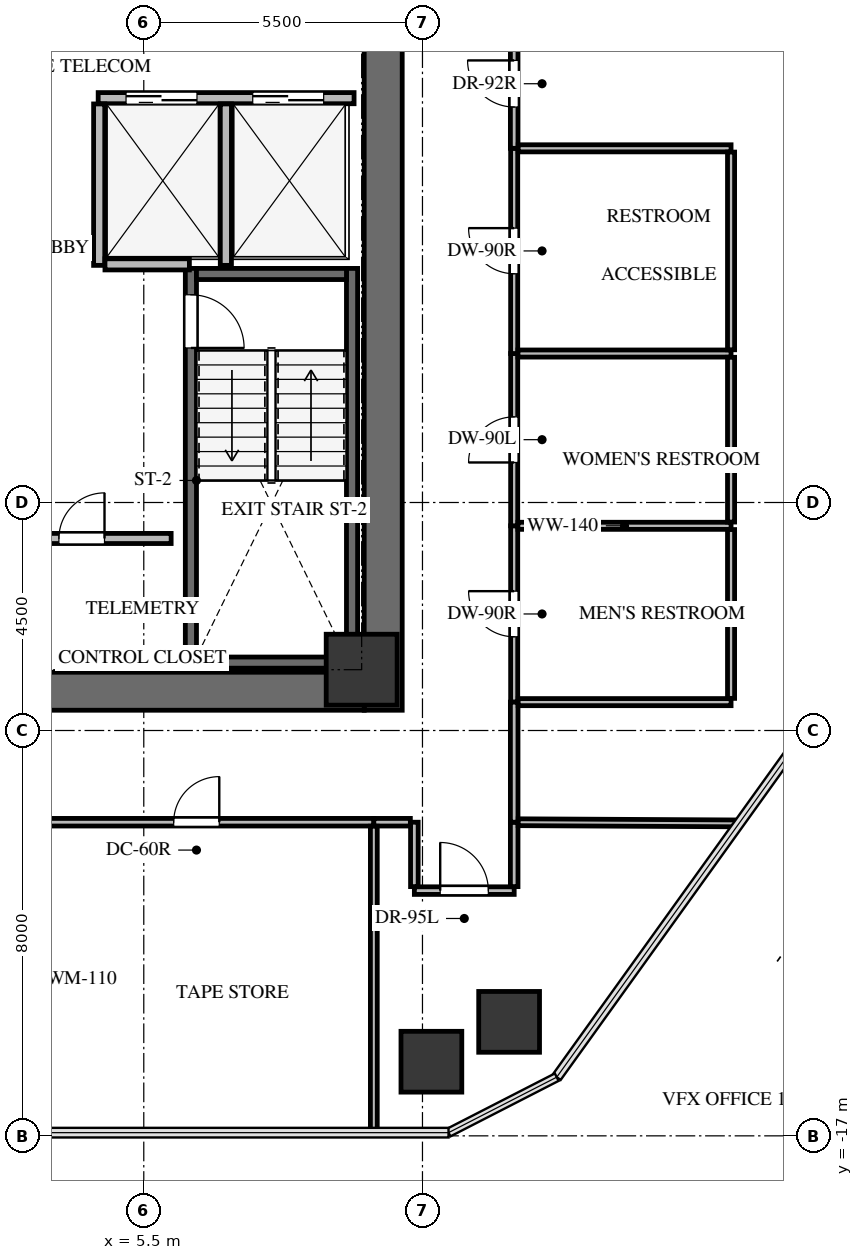
"""IFC4 building model, lengths in metres.
Left out: names, types, materials, properties, quantities, classifications, styles, units other than length and angle.
Written with IfcOpenShell. Run it as: python <this file> out.ifc"""

import sys

from ifc_helpers import new_model, si_unit, direction, frame, frame_2d, origin, origin_2d, place, context, subcontext, project, spatial, rectangle, extrude, source, transform, mapped, element, fill, save


model = new_model("IFC4")
c1 = context("Model", 3, precision=1e-05, world=origin(), true_north=direction((0.0, 1.0)))
c2 = subcontext(c1, "Body", "Model", "MODEL_VIEW")
j1 = project(units=[si_unit("LENGTHUNIT", "METRE"), si_unit("PLANEANGLEUNIT", "RADIAN")], contexts=[c1])
p1 = place(None, origin())
s1 = spatial("IfcSite", under=j1, at=p1, CompositionType="ELEMENT")
p2 = place(p1, origin())
s2 = spatial("IfcBuilding", under=s1, at=p2, CompositionType="ELEMENT")
p3 = place(p2, frame((0.0, 0.0, 107.4)))
s3 = spatial("IfcBuildingStorey", under=s2, at=p3, CompositionType="ELEMENT", Elevation=107.4)
p4 = place(p3, frame((10.225, -8.6, 0.0), z_axis=(0.0, 0.0, 1.0), x_axis=(0.0, 1.0, 0.0)))
e1 = element("IfcWall", 1, at=p4, inside=s3, PredefinedType="SHEAR", context=c2, shape_type="SweptSolid", body=[
    extrude(rectangle(XDim=17.2, YDim=0.75, at=frame_2d((8.6, 0.0))), origin(), (0.0, 0.0, 1.0), 3.3),
])
p5 = place(p3, frame((2.1, -8.225, 0.0), z_axis=(0.0, 0.0, 1.0), x_axis=(1.0, 0.0, 0.0)))
e2 = element("IfcWall", 2, at=p5, inside=s3, PredefinedType="SHEAR", context=c2, shape_type="SweptSolid", body=[
    extrude(rectangle(XDim=7.75, YDim=0.75, at=frame_2d((3.875, 0.0))), origin(), (0.0, 0.0, 1.0), 3.3),
])
p6 = place(p3, frame((9.61, -7.77, -0.24), z_axis=(0.0, 0.0, 1.0), x_axis=(0.0, 1.0, 0.0)))
e3 = element("IfcWall", 3, at=p6, inside=s3, PredefinedType="SHEAR", context=c2, shape_type="SweptSolid", body=[
    extrude(rectangle(XDim=7.89, YDim=0.22, at=frame_2d((3.945, 0.0))), origin(), (0.0, 0.0, 1.0), 3.3),
])
p7 = place(p3, frame((6.43, 0.12, -0.24), z_axis=(0.0, 0.0, 1.0), x_axis=(0.0, -1.0, 0.0)))
e4 = element("IfcWall", 4, at=p7, inside=s3, PredefinedType="SHEAR", context=c2, shape_type="SweptSolid", body=[
    extrude(rectangle(XDim=7.89, YDim=0.22, at=frame_2d((3.945, 0.0))), origin(), (0.0, 0.0, 1.0), 3.3),
])
p8 = place(p7, frame((0.52, 0.0, 0.0)))
e5 = element("IfcOpeningElement", 5, at=p8, cuts=e4, PredefinedType="OPENING", context=c2, shape_type="SweptSolid", body=[
    extrude(rectangle(XDim=1.05, YDim=2.15, at=frame_2d((0.525, 1.075))), frame((0.0, 0.12, 0.0), z_axis=(0.0, -1.0, 0.0), x_axis=(1.0, 0.0, 0.0)), (0.0, 0.0, 1.0), 0.24),
])
for number, where, z_axis, x_axis in (
    (6, (6.54, -7.66, -0.24), (0.0, 0.0, 1.0), (1.0, 0.0, 0.0)),
    (7, (9.5, 0.01, -0.24), (0.0, 0.0, 1.0), (-1.0, 0.0, 0.0)),
):
    element("IfcWall", number, at=place(p3, frame(where, z_axis=z_axis, x_axis=x_axis)), inside=s3, PredefinedType="SHEAR", context=c2, shape_type="SweptSolid", body=[
        extrude(rectangle(XDim=2.96, YDim=0.22, at=frame_2d((1.48, 0.0))), origin(), (0.0, 0.0, 1.0), 3.3),
    ])
m1 = source(origin(), c2, "Body", "SweptSolid", [
    extrude(rectangle(XDim=1.4, YDim=1.4, at=origin_2d()), origin(), (0.0, 0.0, 1.0), 3.3),
])
p9 = place(p3, frame((9.8, -7.8, -0.24), z_axis=(0.0, 0.0, 1.0), x_axis=(1.0, 0.0, 0.0)))
e8 = element("IfcColumn", 8, at=p9, inside=s3, PredefinedType="COLUMN", context=c2, shape_type="MappedRepresentation", body=[
    mapped(m1, transform((0.0, 0.0, 0.0), x_axis=(1.0, 0.0, 0.0), y_axis=(0.0, 1.0, 0.0), z_axis=(0.0, 0.0, 1.0), scale=1.0)),
])
m2 = source(origin(), c2, "Body", "SweptSolid", [
    extrude(rectangle(XDim=1.2, YDim=1.2, at=origin_2d()), origin(), (0.0, 0.0, 1.0), 3.3),
])
for number, where, z_axis, x_axis in (
    (9, (12.71, -14.75, -0.24), (0.0, 0.0, 1.0), (1.0, 0.0, 0.0)),
    (10, (11.176, -15.537, -0.24), (0.0, 0.0, 1.0), (1.0, 0.0, 0.0)),
):
    element("IfcColumn", number, at=place(p3, frame(where, z_axis=z_axis, x_axis=x_axis)), inside=s3, PredefinedType="COLUMN", context=c2, shape_type="MappedRepresentation", body=[
        mapped(m2, transform((0.0, 0.0, 0.0), x_axis=(1.0, 0.0, 0.0), y_axis=(0.0, 1.0, 0.0), z_axis=(0.0, 0.0, 1.0), scale=1.0)),
    ])
p10 = place(p3, frame((4.6, 3.48, 0.0), z_axis=(0.0, 0.0, 1.0), x_axis=(1.0, 0.0, 0.0)))
e11 = element("IfcWall", 11, at=p10, inside=s3, PredefinedType="SOLIDWALL", context=c2, shape_type="SweptSolid", body=[
    extrude(rectangle(XDim=5.05, YDim=0.22, at=frame_2d((2.525, 0.0))), origin(), (0.0, 0.0, 1.0), 3.045),
])
p11 = place(p10, frame((0.55, 0.0, 0.0)))
e12 = element("IfcOpeningElement", 12, at=p11, cuts=e11, PredefinedType="OPENING", context=c2, shape_type="SweptSolid", body=[
    extrude(rectangle(XDim=1.4, YDim=2.15, at=frame_2d((0.7, 1.075))), frame((0.0, 0.12, 0.0), z_axis=(0.0, -1.0, 0.0), x_axis=(1.0, 0.0, 0.0)), (0.0, 0.0, 1.0), 0.24),
])
p12 = place(p10, frame((3.05, 0.0, 0.0)))
e13 = element("IfcOpeningElement", 13, at=p12, cuts=e11, PredefinedType="OPENING", context=c2, shape_type="SweptSolid", body=[
    extrude(rectangle(XDim=1.4, YDim=2.15, at=frame_2d((0.7, 1.075))), frame((0.0, 0.12, 0.0), z_axis=(0.0, -1.0, 0.0), x_axis=(1.0, 0.0, 0.0)), (0.0, 0.0, 1.0), 0.24),
])
for number, where, z_axis, x_axis in (
    (14, (4.62, 0.18, 0.0), (0.0, 0.0, 1.0), (0.0, 1.0, 0.0)),
    (15, (7.12, 0.18, 0.0), (0.0, 0.0, 1.0), (0.0, 1.0, 0.0)),
):
    element("IfcWall", number, at=place(p3, frame(where, z_axis=z_axis, x_axis=x_axis)), inside=s3, PredefinedType="SOLIDWALL", context=c2, shape_type="SweptSolid", body=[
        extrude(rectangle(XDim=3.186, YDim=0.22, at=frame_2d((1.593, 0.0))), origin(), (0.0, 0.0, 1.0), 3.045),
    ])
p13 = place(p3, frame((4.734, 0.2, 0.0), z_axis=(0.0, 0.0, 1.0), x_axis=(1.0, 0.0, 0.0)))
e16 = element("IfcWall", 16, at=p13, inside=s3, PredefinedType="SOLIDWALL", context=c2, shape_type="SweptSolid", body=[
    extrude(rectangle(XDim=1.666, YDim=0.22, at=frame_2d((0.833, 0.0))), origin(), (0.0, 0.0, 1.0), 3.045),
])
p14 = place(p3, frame((2.51, -5.21, 0.0), z_axis=(0.0, 0.0, 1.0), x_axis=(1.0, 0.0, 0.0)))
e17 = element("IfcWall", 17, at=p14, inside=s3, PredefinedType="SOLIDWALL", context=c2, shape_type="SweptSolid", body=[
    extrude(rectangle(XDim=3.53, YDim=0.2, at=frame_2d((1.765, 0.0))), origin(), (0.0, 0.0, 1.0), 3.045),
])
p15 = place(p14, frame((1.315, 0.0, 0.0)))
e18 = element("IfcOpeningElement", 18, at=p15, cuts=e17, PredefinedType="OPENING", context=c2, shape_type="SweptSolid", body=[
    extrude(rectangle(XDim=0.9, YDim=2.05, at=frame_2d((0.45, 1.025))), frame((0.0, 0.11, 0.0), z_axis=(0.0, -1.0, 0.0), x_axis=(1.0, 0.0, 0.0)), (0.0, 0.0, 1.0), 0.22),
])
p16 = place(p3, frame((12.81, -8.44, 0.0), z_axis=(0.0, 0.0, 1.0), x_axis=(0.0, 1.0, 0.0)))
e19 = element("IfcWall", 19, at=p16, inside=s3, PredefinedType="PARTITIONING", context=c2, shape_type="SweptSolid", body=[
    extrude(rectangle(XDim=3.48, YDim=0.14, at=frame_2d((1.74, 0.0))), origin(), (0.0, 0.0, 1.0), 3.045),
])
p17 = place(p16, frame((1.29, 0.0, 0.0)))
e20 = element("IfcOpeningElement", 20, at=p17, cuts=e19, PredefinedType="OPENING", context=c2, shape_type="SweptSolid", body=[
    extrude(rectangle(XDim=0.9, YDim=2.05, at=frame_2d((0.45, 1.025))), frame((0.0, 0.08, 0.0), z_axis=(0.0, -1.0, 0.0), x_axis=(1.0, 0.0, 0.0)), (0.0, 0.0, 1.0), 0.16),
])
p18 = place(p3, frame((12.81, -4.96, 0.0), z_axis=(0.0, 0.0, 1.0), x_axis=(0.0, 1.0, 0.0)))
e21 = element("IfcWall", 21, at=p18, inside=s3, PredefinedType="PARTITIONING", context=c2, shape_type="SweptSolid", body=[
    extrude(rectangle(XDim=3.4, YDim=0.14, at=frame_2d((1.7, 0.0))), origin(), (0.0, 0.0, 1.0), 3.045),
])
p19 = place(p18, frame((1.25, 0.0, 0.0)))
e22 = element("IfcOpeningElement", 22, at=p19, cuts=e21, PredefinedType="OPENING", context=c2, shape_type="SweptSolid", body=[
    extrude(rectangle(XDim=0.9, YDim=2.05, at=frame_2d((0.45, 1.025))), frame((0.0, 0.08, 0.0), z_axis=(0.0, -1.0, 0.0), x_axis=(1.0, 0.0, 0.0)), (0.0, 0.0, 1.0), 0.16),
])
p20 = place(p3, frame((12.81, -1.56, 0.0), z_axis=(0.0, 0.0, 1.0), x_axis=(0.0, 1.0, 0.0)))
e23 = element("IfcWall", 23, at=p20, inside=s3, PredefinedType="PARTITIONING", context=c2, shape_type="SweptSolid", body=[
    extrude(rectangle(XDim=4.05, YDim=0.14, at=frame_2d((2.025, 0.0))), origin(), (0.0, 0.0, 1.0), 2.212),
])
p21 = place(p20, frame((1.575, 0.0, 0.0)))
e24 = element("IfcOpeningElement", 24, at=p21, cuts=e23, PredefinedType="OPENING", context=c2, shape_type="SweptSolid", body=[
    extrude(rectangle(XDim=0.9, YDim=2.05, at=frame_2d((0.45, 1.025))), frame((0.0, 0.08, 0.0), z_axis=(0.0, -1.0, 0.0), x_axis=(1.0, 0.0, 0.0)), (0.0, 0.0, 1.0), 0.16),
])
p22 = place(p3, frame((3.04, -10.81, 0.0), z_axis=(0.0, 0.0, 1.0), x_axis=(1.0, 0.0, 0.0)))
e25 = element("IfcWall", 25, at=p22, inside=s3, PredefinedType="PARTITIONING", context=c2, shape_type="SweptSolid", body=[
    extrude(rectangle(XDim=7.0, YDim=0.15, at=frame_2d((3.5, 0.0))), origin(), (0.0, 0.0, 1.0), 2.212),
])
p23 = place(p22, frame((3.05, 0.0, 0.0)))
e26 = element("IfcOpeningElement", 26, at=p23, cuts=e25, PredefinedType="OPENING", context=c2, shape_type="SweptSolid", body=[
    extrude(rectangle(XDim=0.9, YDim=2.05, at=frame_2d((0.45, 1.025))), frame((0.0, 0.085, 0.0), z_axis=(0.0, -1.0, 0.0), x_axis=(1.0, 0.0, 0.0)), (0.0, 0.0, 1.0), 0.17),
])
p24 = place(p3, frame((10.84, -12.16, 0.0), z_axis=(0.0, 0.0, 1.0), x_axis=(1.0, 0.0, 0.0)))
e27 = element("IfcWall", 27, at=p24, inside=s3, PredefinedType="PARTITIONING", context=c2, shape_type="SweptSolid", body=[
    extrude(rectangle(XDim=1.97, YDim=0.15, at=frame_2d((0.985, 0.0))), origin(), (0.0, 0.0, 1.0), 3.045),
])
p25 = place(p24, frame((0.51, 0.0, 0.0)))
e28 = element("IfcOpeningElement", 28, at=p25, cuts=e27, PredefinedType="OPENING", context=c2, shape_type="SweptSolid", body=[
    extrude(rectangle(XDim=0.95, YDim=2.1, at=frame_2d((0.475, 1.05))), frame((0.0, 0.085, 0.0), z_axis=(0.0, -1.0, 0.0), x_axis=(1.0, 0.0, 0.0)), (0.0, 0.0, 1.0), 0.17),
])
for number, where, z_axis, x_axis in (
    (29, (10.84, -10.81, 0.0), (0.0, 0.0, 1.0), (0.0, -1.0, 0.0)),
    (30, (12.81, -12.081, 0.0), (0.0, 0.0, 1.0), (0.0, 1.0, 0.0)),
):
    element("IfcWall", number, at=place(p3, frame(where, z_axis=z_axis, x_axis=x_axis)), inside=s3, PredefinedType="PARTITIONING", context=c2, shape_type="SweptSolid", body=[
        extrude(rectangle(XDim=1.271, YDim=0.15, at=frame_2d((0.635, 0.0))), origin(), (0.0, 0.0, 1.0), 3.045),
    ])
p26 = place(p3, frame((10.04, -10.81, 0.0), z_axis=(0.0, 0.0, 1.0), x_axis=(1.0, 0.0, 0.0)))
e31 = element("IfcWall", 31, at=p26, inside=s3, PredefinedType="PARTITIONING", context=c2, shape_type="SweptSolid", body=[
    extrude(rectangle(XDim=0.721, YDim=0.15, at=frame_2d((0.36, 0.0))), origin(), (0.0, 0.0, 1.0), 3.045),
])
p27 = place(p3, frame((12.81, 2.49, 0.0), z_axis=(0.0, 0.0, 1.0), x_axis=(0.0, 1.0, 0.0)))
e32 = element("IfcWall", 32, at=p27, inside=s3, PredefinedType="PARTITIONING", context=c2, shape_type="SweptSolid", body=[
    extrude(rectangle(XDim=2.55, YDim=0.15, at=frame_2d((1.275, 0.0))), origin(), (0.0, 0.0, 1.0), 3.045),
])
p28 = place(p27, frame((0.815, 0.0, 0.0)))
e33 = element("IfcOpeningElement", 33, at=p28, cuts=e32, PredefinedType="OPENING", context=c2, shape_type="SweptSolid", body=[
    extrude(rectangle(XDim=0.92, YDim=2.1, at=frame_2d((0.46, 1.05))), frame((0.0, 0.085, 0.0), z_axis=(0.0, -1.0, 0.0), x_axis=(1.0, 0.0, 0.0)), (0.0, 0.0, 1.0), 0.17),
])
p29 = place(p3, frame((12.81, -10.81, 0.0), z_axis=(0.0, 0.0, 1.0), x_axis=(0.0, 1.0, 0.0)))
e34 = element("IfcWall", 34, at=p29, inside=s3, PredefinedType="PARTITIONING", context=c2, shape_type="SweptSolid", body=[
    extrude(rectangle(XDim=2.37, YDim=0.15, at=frame_2d((1.185, 0.0))), origin(), (0.0, 0.0, 1.0), 3.045),
])
p30 = place(p3, frame((12.884, -4.96, 0.0), z_axis=(0.0, 0.0, 1.0), x_axis=(1.0, 0.0, 0.0)))
e35 = element("IfcWall", 35, at=p30, inside=s3, PredefinedType="PARTITIONING", context=c2, shape_type="SweptSolid", body=[
    extrude(rectangle(XDim=4.206, YDim=0.14, at=frame_2d((2.103, 0.0))), origin(), (0.0, 0.0, 1.0), 3.045),
])
p31 = place(p3, frame((17.09, -8.44, 0.0), z_axis=(0.0, 0.0, 1.0), x_axis=(-1.0, 0.0, 0.0)))
e36 = element("IfcWall", 36, at=p31, inside=s3, PredefinedType="PARTITIONING", context=c2, shape_type="SweptSolid", body=[
    extrude(rectangle(XDim=4.201, YDim=0.14, at=frame_2d((2.101, 0.0))), origin(), (0.0, 0.0, 1.0), 2.38),
])
p32 = place(p3, frame((17.09, -5.034, 0.0), z_axis=(0.0, 0.0, 1.0), x_axis=(0.0, -1.0, 0.0)))
e37 = element("IfcWall", 37, at=p32, inside=s3, PredefinedType="PARTITIONING", context=c2, shape_type="SweptSolid", body=[
    extrude(rectangle(XDim=3.332, YDim=0.14, at=frame_2d((1.666, 0.0))), origin(), (0.0, 0.0, 1.0), 2.38),
])
p33 = place(p3, frame((12.884, -1.56, 0.0), z_axis=(0.0, 0.0, 1.0), x_axis=(1.0, 0.0, 0.0)))
e38 = element("IfcWall", 38, at=p33, inside=s3, PredefinedType="PARTITIONING", context=c2, shape_type="SweptSolid", body=[
    extrude(rectangle(XDim=4.206, YDim=0.14, at=frame_2d((2.103, 0.0))), origin(), (0.0, 0.0, 1.0), 3.045),
])
p34 = place(p3, frame((17.09, -1.634, 0.0), z_axis=(0.0, 0.0, 1.0), x_axis=(0.0, -1.0, 0.0)))
e39 = element("IfcWall", 39, at=p34, inside=s3, PredefinedType="PARTITIONING", context=c2, shape_type="SweptSolid", body=[
    extrude(rectangle(XDim=3.252, YDim=0.14, at=frame_2d((1.626, 0.0))), origin(), (0.0, 0.0, 1.0), 3.045),
])
p35 = place(p3, frame((12.889, 2.49, 0.0), z_axis=(0.0, 0.0, 1.0), x_axis=(1.0, 0.0, 0.0)))
e40 = element("IfcWall", 40, at=p35, inside=s3, PredefinedType="PARTITIONING", context=c2, shape_type="SweptSolid", body=[
    extrude(rectangle(XDim=4.201, YDim=0.14, at=frame_2d((2.101, 0.0))), origin(), (0.0, 0.0, 1.0), 3.045),
])
p36 = place(p3, frame((17.09, 2.416, 0.0), z_axis=(0.0, 0.0, 1.0), x_axis=(0.0, -1.0, 0.0)))
e41 = element("IfcWall", 41, at=p36, inside=s3, PredefinedType="PARTITIONING", context=c2, shape_type="SweptSolid", body=[
    extrude(rectangle(XDim=3.902, YDim=0.14, at=frame_2d((1.951, 0.0))), origin(), (0.0, 0.0, 1.0), 2.212),
])
p37 = place(p3, frame((10.04, -10.889, 0.0), z_axis=(0.0, 0.0, 1.0), x_axis=(0.0, -1.0, 0.0)))
e42 = element("IfcWall", 42, at=p37, inside=s3, PredefinedType="PARTITIONING", context=c2, shape_type="SweptSolid", body=[
    extrude(rectangle(XDim=6.048, YDim=0.135, at=frame_2d((3.024, 0.0))), origin(), (0.0, 0.0, 1.0), 2.212),
])
p38 = place(p3, frame((12.889, -10.81, 0.0), z_axis=(0.0, 0.0, 1.0), x_axis=(0.999986140562, -0.005264853658, 0.0)))
e43 = element("IfcWall", 43, at=p38, inside=s3, PredefinedType="PARTITIONING", context=c2, shape_type="SweptSolid", body=[
    extrude(rectangle(XDim=4.359, YDim=0.135, at=frame_2d((2.179, 0.0))), origin(), (0.0, 0.0, 1.0), 2.38),
])
m3 = source(origin(), c2, "Body", "SweptSolid", [
    extrude(rectangle(XDim=1.05, YDim=2.15, at=frame_2d((0.525, 1.075))), frame((0.0, 0.025, 0.0), z_axis=(0.0, -1.0, 0.0), x_axis=(1.0, 0.0, 0.0)), (0.0, 0.0, 1.0), 0.05),
])
p39 = place(p8, origin())
e44 = element("IfcDoor", 44, at=p39, inside=s3, OperationType="SINGLE_SWING_RIGHT", PredefinedType="DOOR", context=c2, shape_type="MappedRepresentation", body=[
    mapped(m3, transform((0.0, 0.0, 0.0), x_axis=(1.0, 0.0, 0.0), y_axis=(0.0, 1.0, 0.0), z_axis=(0.0, 0.0, 1.0), scale=1.0)),
])
fill(e5, e44)
m4 = source(origin(), c2, "Body", "SweptSolid", [
    extrude(rectangle(XDim=1.4, YDim=2.15, at=frame_2d((0.7, 1.075))), frame((0.0, 0.025, 0.0), z_axis=(0.0, -1.0, 0.0), x_axis=(1.0, 0.0, 0.0)), (0.0, 0.0, 1.0), 0.05),
])
p40 = place(p11, origin())
e45 = element("IfcDoor", 45, at=p40, inside=s3, OperationType="DOUBLE_DOOR_SLIDING", PredefinedType="DOOR", context=c2, shape_type="MappedRepresentation", body=[
    mapped(m4, transform((0.0, 0.0, 0.0), x_axis=(1.0, 0.0, 0.0), y_axis=(0.0, 1.0, 0.0), z_axis=(0.0, 0.0, 1.0), scale=1.0)),
])
fill(e12, e45)
p41 = place(p12, origin())
e46 = element("IfcDoor", 46, at=p41, inside=s3, OperationType="DOUBLE_DOOR_SLIDING", PredefinedType="DOOR", context=c2, shape_type="MappedRepresentation", body=[
    mapped(m4, transform((0.0, 0.0, 0.0), x_axis=(1.0, 0.0, 0.0), y_axis=(0.0, 1.0, 0.0), z_axis=(0.0, 0.0, 1.0), scale=1.0)),
])
fill(e13, e46)
m5 = source(origin(), c2, "Body", "SweptSolid", [
    extrude(rectangle(XDim=0.9, YDim=2.05, at=frame_2d((0.45, 1.025))), frame((0.0, 0.025, 0.0), z_axis=(0.0, -1.0, 0.0), x_axis=(1.0, 0.0, 0.0)), (0.0, 0.0, 1.0), 0.05),
])
p42 = place(p15, origin())
e47 = element("IfcDoor", 47, at=p42, inside=s3, OperationType="SINGLE_SWING_RIGHT", PredefinedType="DOOR", context=c2, shape_type="MappedRepresentation", body=[
    mapped(m5, transform((0.0, 0.0, 0.0), x_axis=(1.0, 0.0, 0.0), y_axis=(0.0, 1.0, 0.0), z_axis=(0.0, 0.0, 1.0), scale=1.0)),
])
fill(e18, e47)
m6 = source(origin(), c2, "Body", "SweptSolid", [
    extrude(rectangle(XDim=0.9, YDim=2.05, at=frame_2d((0.45, 1.025))), frame((0.0, 0.025, 0.0), z_axis=(0.0, -1.0, 0.0), x_axis=(1.0, 0.0, 0.0)), (0.0, 0.0, 1.0), 0.05),
])
p43 = place(p17, origin())
e48 = element("IfcDoor", 48, at=p43, inside=s3, OperationType="SINGLE_SWING_RIGHT", PredefinedType="DOOR", context=c2, shape_type="MappedRepresentation", body=[
    mapped(m6, transform((0.0, 0.0, 0.0), x_axis=(1.0, 0.0, 0.0), y_axis=(0.0, 1.0, 0.0), z_axis=(0.0, 0.0, 1.0), scale=1.0)),
])
fill(e20, e48)
m7 = source(origin(), c2, "Body", "SweptSolid", [
    extrude(rectangle(XDim=0.9, YDim=2.05, at=frame_2d((0.45, 1.025))), frame((0.0, 0.025, 0.0), z_axis=(0.0, -1.0, 0.0), x_axis=(1.0, 0.0, 0.0)), (0.0, 0.0, 1.0), 0.05),
])
p44 = place(p19, origin())
e49 = element("IfcDoor", 49, at=p44, inside=s3, OperationType="SINGLE_SWING_LEFT", PredefinedType="DOOR", context=c2, shape_type="MappedRepresentation", body=[
    mapped(m7, transform((0.0, 0.0, 0.0), x_axis=(1.0, 0.0, 0.0), y_axis=(0.0, 1.0, 0.0), z_axis=(0.0, 0.0, 1.0), scale=1.0)),
])
fill(e22, e49)
p45 = place(p21, origin())
e50 = element("IfcDoor", 50, at=p45, inside=s3, OperationType="SINGLE_SWING_RIGHT", PredefinedType="DOOR", context=c2, shape_type="MappedRepresentation", body=[
    mapped(m6, transform((0.0, 0.0, 0.0), x_axis=(1.0, 0.0, 0.0), y_axis=(0.0, 1.0, 0.0), z_axis=(0.0, 0.0, 1.0), scale=1.0)),
])
fill(e24, e50)
p46 = place(p23, origin())
e51 = element("IfcDoor", 51, at=p46, inside=s3, OperationType="SINGLE_SWING_RIGHT", PredefinedType="DOOR", context=c2, shape_type="MappedRepresentation", body=[
    mapped(m5, transform((0.0, 0.0, 0.0), x_axis=(1.0, 0.0, 0.0), y_axis=(0.0, 1.0, 0.0), z_axis=(0.0, 0.0, 1.0), scale=1.0)),
])
fill(e26, e51)
m8 = source(origin(), c2, "Body", "SweptSolid", [
    extrude(rectangle(XDim=0.95, YDim=2.1, at=frame_2d((0.475, 1.05))), frame((0.0, 0.025, 0.0), z_axis=(0.0, -1.0, 0.0), x_axis=(1.0, 0.0, 0.0)), (0.0, 0.0, 1.0), 0.05),
])
p47 = place(p25, origin())
e52 = element("IfcDoor", 52, at=p47, inside=s3, OperationType="SINGLE_SWING_LEFT", PredefinedType="DOOR", context=c2, shape_type="MappedRepresentation", body=[
    mapped(m8, transform((0.0, 0.0, 0.0), x_axis=(1.0, 0.0, 0.0), y_axis=(0.0, 1.0, 0.0), z_axis=(0.0, 0.0, 1.0), scale=1.0)),
])
fill(e28, e52)
m9 = source(origin(), c2, "Body", "SweptSolid", [
    extrude(rectangle(XDim=0.92, YDim=2.1, at=frame_2d((0.46, 1.05))), frame((0.0, 0.025, 0.0), z_axis=(0.0, -1.0, 0.0), x_axis=(1.0, 0.0, 0.0)), (0.0, 0.0, 1.0), 0.05),
])
p48 = place(p28, origin())
e53 = element("IfcDoor", 53, at=p48, inside=s3, OperationType="SINGLE_SWING_RIGHT", PredefinedType="DOOR", context=c2, shape_type="MappedRepresentation", body=[
    mapped(m9, transform((0.0, 0.0, 0.0), x_axis=(1.0, 0.0, 0.0), y_axis=(0.0, 1.0, 0.0), z_axis=(0.0, 0.0, 1.0), scale=1.0)),
])
fill(e33, e53)
save(model, sys.argv[1])
